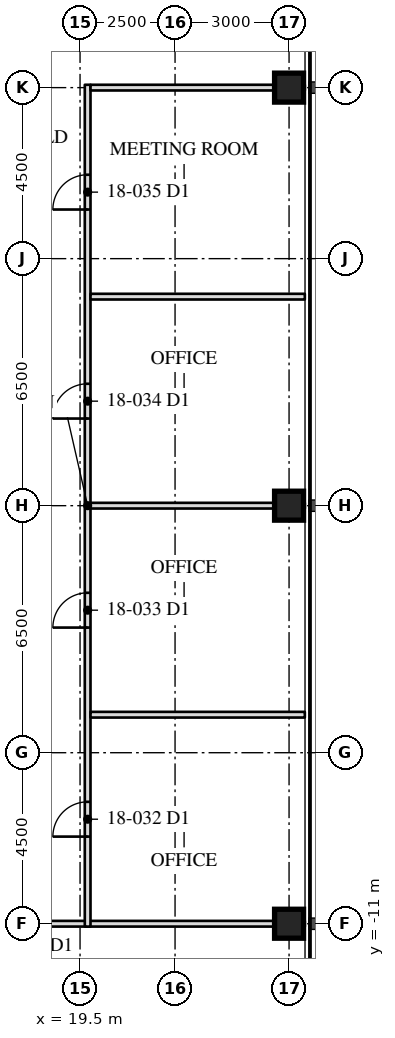
"""IFC4 building model, lengths in metres.
Left out: names, types, materials, properties, quantities, classifications, styles, units other than length and angle.
Written with IfcOpenShell. Run it as: python <this file> out.ifc"""

import sys

from ifc_helpers import new_model, si_unit, direction, frame, frame_2d, origin, origin_2d, place, context, subcontext, project, spatial, rectangle, hollow_rectangle, extrude, element, fill, save


model = new_model("IFC4")
c1 = context("Model", 3, precision=1e-05, world=origin(), true_north=direction((0.0, 1.0)))
c2 = subcontext(c1, "Body", "Model", "MODEL_VIEW")
j1 = project(units=[si_unit("LENGTHUNIT", "METRE"), si_unit("PLANEANGLEUNIT", "RADIAN")], contexts=[c1])
p1 = place(None, origin())
s1 = spatial("IfcSite", under=j1, at=p1, CompositionType="ELEMENT")
p2 = place(p1, origin())
s2 = spatial("IfcBuilding", under=s1, at=p2, CompositionType="ELEMENT")
p3 = place(p2, frame((0.0, 0.0, 77.5)))
s3 = spatial("IfcBuildingStorey", under=s2, at=p3, CompositionType="ELEMENT", Elevation=77.5)
for number, where, z_axis, x_axis in (
    (1, (25.0, -11.0, 0.0), (0.0, 0.0, 1.0), (0.0, 1.0, 0.0)),
    (2, (25.0, 0.0, 0.0), (0.0, 0.0, 1.0), (0.0, 1.0, 0.0)),
    (3, (25.0, 11.0, 0.0), (0.0, 0.0, 1.0), (0.0, 1.0, 0.0)),
):
    element("IfcColumn", number, at=place(p3, frame(where, z_axis=z_axis, x_axis=x_axis)), inside=s3, PredefinedType="COLUMN", context=c2, shape_type="SweptSolid", body=[
        extrude(hollow_rectangle(XDim=0.762, YDim=0.762, WallThickness=0.127, at=origin_2d()), origin(), (0.0, 0.0, 1.0), 4.1),
    ])
p4 = place(p3, frame((11.75, -11.0, 0.0), z_axis=(0.0, 0.0, 1.0), x_axis=(1.0, 0.0, 0.0)))
e4 = element("IfcWall", 4, at=p4, inside=s3, PredefinedType="PARTITIONING", context=c2, shape_type="SweptSolid", body=[
    extrude(rectangle(XDim=13.665, YDim=0.15, at=frame_2d((6.833, 0.0))), origin(), (0.0, 0.0, 1.0), 3.13),
])
p5 = place(p4, frame((6.018, 0.0, 0.0)))
e5 = element("IfcOpeningElement", 5, at=p5, cuts=e4, PredefinedType="OPENING", context=c2, shape_type="SweptSolid", body=[
    extrude(rectangle(XDim=0.915, YDim=2.134, at=frame_2d((0.458, 1.067))), frame((0.0, 0.085, 0.0), z_axis=(0.0, -1.0, 0.0), x_axis=(1.0, 0.0, 0.0)), (0.0, 0.0, 1.0), 0.17),
])
p6 = place(p3, frame((19.7, -11.075, 0.0), z_axis=(0.0, 0.0, 1.0), x_axis=(0.0, 1.0, 0.0)))
e6 = element("IfcWall", 6, at=p6, inside=s3, PredefinedType="PARTITIONING", context=c2, shape_type="SweptSolid", body=[
    extrude(rectangle(XDim=22.15, YDim=0.15, at=frame_2d((11.075, 0.0))), origin(), (0.0, 0.0, 1.0), 3.91),
])
p7 = place(p6, frame((2.367, 0.0, 0.0)))
e7 = element("IfcOpeningElement", 7, at=p7, cuts=e6, PredefinedType="OPENING", context=c2, shape_type="SweptSolid", body=[
    extrude(rectangle(XDim=0.915, YDim=2.134, at=frame_2d((0.458, 1.067))), frame((0.0, 0.085, 0.0), z_axis=(0.0, -1.0, 0.0), x_axis=(1.0, 0.0, 0.0)), (0.0, 0.0, 1.0), 0.17),
])
p8 = place(p6, frame((7.867, 0.0, 0.0)))
e8 = element("IfcOpeningElement", 8, at=p8, cuts=e6, PredefinedType="OPENING", context=c2, shape_type="SweptSolid", body=[
    extrude(rectangle(XDim=0.915, YDim=2.134, at=frame_2d((0.458, 1.067))), frame((0.0, 0.085, 0.0), z_axis=(0.0, -1.0, 0.0), x_axis=(1.0, 0.0, 0.0)), (0.0, 0.0, 1.0), 0.17),
])
p9 = place(p6, frame((13.367, 0.0, 0.0)))
e9 = element("IfcOpeningElement", 9, at=p9, cuts=e6, PredefinedType="OPENING", context=c2, shape_type="SweptSolid", body=[
    extrude(rectangle(XDim=0.915, YDim=2.134, at=frame_2d((0.458, 1.067))), frame((0.0, 0.085, 0.0), z_axis=(0.0, -1.0, 0.0), x_axis=(1.0, 0.0, 0.0)), (0.0, 0.0, 1.0), 0.17),
])
p10 = place(p6, frame((18.867, 0.0, 0.0)))
e10 = element("IfcOpeningElement", 10, at=p10, cuts=e6, PredefinedType="OPENING", context=c2, shape_type="SweptSolid", body=[
    extrude(rectangle(XDim=0.915, YDim=2.134, at=frame_2d((0.458, 1.067))), frame((0.0, 0.085, 0.0), z_axis=(0.0, -1.0, 0.0), x_axis=(1.0, 0.0, 0.0)), (0.0, 0.0, 1.0), 0.17),
])
p11 = place(p3, frame((19.775, -5.5, 0.0), z_axis=(0.0, 0.0, 1.0), x_axis=(1.0, 0.0, 0.0)))
e11 = element("IfcWall", 11, at=p11, inside=s3, PredefinedType="PARTITIONING", context=c2, shape_type="SweptSolid", body=[
    extrude(rectangle(XDim=5.64, YDim=0.15, at=frame_2d((2.82, 0.0))), origin(), (0.0, 0.0, 1.0), 3.91),
])
p12 = place(p3, frame((19.775, 0.0, 0.0), z_axis=(0.0, 0.0, 1.0), x_axis=(1.0, 0.0, 0.0)))
e12 = element("IfcWall", 12, at=p12, inside=s3, PredefinedType="PARTITIONING", context=c2, shape_type="SweptSolid", body=[
    extrude(rectangle(XDim=5.64, YDim=0.15, at=frame_2d((2.82, 0.0))), origin(), (0.0, 0.0, 1.0), 3.13),
])
p13 = place(p3, frame((19.775, 5.5, 0.0), z_axis=(0.0, 0.0, 1.0), x_axis=(1.0, 0.0, 0.0)))
e13 = element("IfcWall", 13, at=p13, inside=s3, PredefinedType="PARTITIONING", context=c2, shape_type="SweptSolid", body=[
    extrude(rectangle(XDim=5.64, YDim=0.15, at=frame_2d((2.82, 0.0))), origin(), (0.0, 0.0, 1.0), 3.91),
])
p14 = place(p3, frame((19.775, 11.0, 0.0), z_axis=(0.0, 0.0, 1.0), x_axis=(1.0, 0.0, 0.0)))
e14 = element("IfcWall", 14, at=p14, inside=s3, PredefinedType="PARTITIONING", context=c2, shape_type="SweptSolid", body=[
    extrude(rectangle(XDim=5.64, YDim=0.15, at=frame_2d((2.82, 0.0))), origin(), (0.0, 0.0, 1.0), 3.13),
])
p15 = place(p7, origin())
e15 = element("IfcDoor", 15, at=p15, inside=s3, OperationType="SINGLE_SWING_LEFT", PredefinedType="DOOR", context=c2, shape_type="SweptSolid", body=[
    extrude(rectangle(XDim=0.915, YDim=2.134, at=frame_2d((0.458, 1.067))), frame((0.0, 0.025, 0.0), z_axis=(0.0, -1.0, 0.0), x_axis=(1.0, 0.0, 0.0)), (0.0, 0.0, 1.0), 0.05),
])
fill(e7, e15)
p16 = place(p8, origin())
e16 = element("IfcDoor", 16, at=p16, inside=s3, OperationType="SINGLE_SWING_LEFT", PredefinedType="DOOR", context=c2, shape_type="SweptSolid", body=[
    extrude(rectangle(XDim=0.915, YDim=2.134, at=frame_2d((0.458, 1.067))), frame((0.0, 0.025, 0.0), z_axis=(0.0, -1.0, 0.0), x_axis=(1.0, 0.0, 0.0)), (0.0, 0.0, 1.0), 0.05),
])
fill(e8, e16)
p17 = place(p9, origin())
e17 = element("IfcDoor", 17, at=p17, inside=s3, OperationType="SINGLE_SWING_LEFT", PredefinedType="DOOR", context=c2, shape_type="SweptSolid", body=[
    extrude(rectangle(XDim=0.915, YDim=2.134, at=frame_2d((0.458, 1.067))), frame((0.0, 0.025, 0.0), z_axis=(0.0, -1.0, 0.0), x_axis=(1.0, 0.0, 0.0)), (0.0, 0.0, 1.0), 0.05),
])
fill(e9, e17)
p18 = place(p10, origin())
e18 = element("IfcDoor", 18, at=p18, inside=s3, OperationType="SINGLE_SWING_LEFT", PredefinedType="DOOR", context=c2, shape_type="SweptSolid", body=[
    extrude(rectangle(XDim=0.915, YDim=2.134, at=frame_2d((0.458, 1.067))), frame((0.0, 0.025, 0.0), z_axis=(0.0, -1.0, 0.0), x_axis=(1.0, 0.0, 0.0)), (0.0, 0.0, 1.0), 0.05),
])
fill(e10, e18)
save(model, sys.argv[1])
